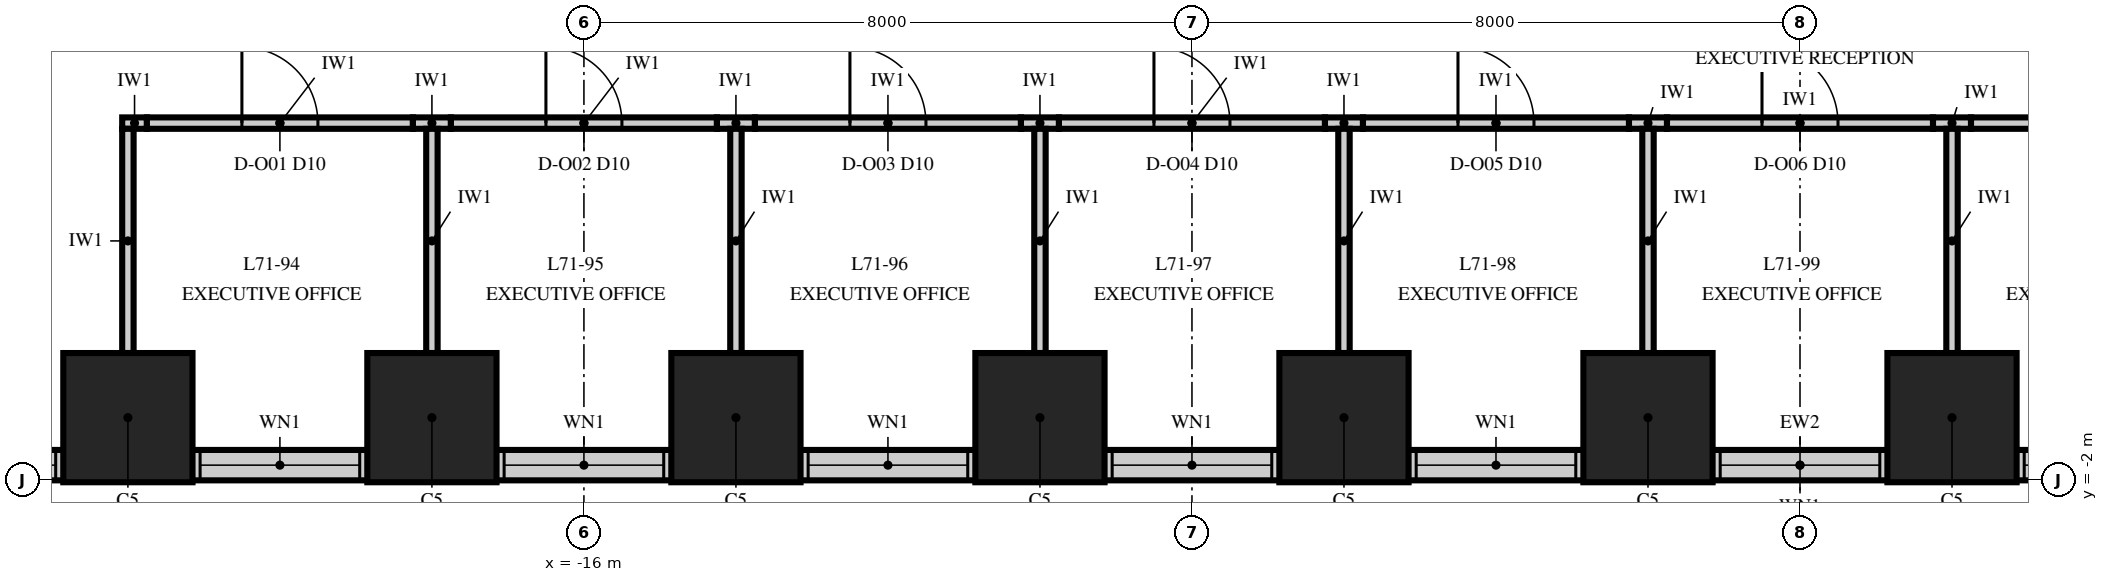
"""IFC4 building model, lengths in metres.
Left out: names, types, materials, properties, quantities, classifications, styles, units other than length and angle.
Written with IfcOpenShell. Run it as: python <this file> out.ifc"""

import sys

from ifc_helpers import new_model, si_unit, direction, frame, frame_2d, origin, origin_2d, place, context, subcontext, project, spatial, rectangle, extrude, element, fill, save


model = new_model("IFC4")
c1 = context("Model", 3, precision=1e-05, world=origin(), true_north=direction((0.0, 1.0)))
c2 = subcontext(c1, "Body", "Model", "MODEL_VIEW")
j1 = project(units=[si_unit("LENGTHUNIT", "METRE"), si_unit("PLANEANGLEUNIT", "RADIAN")], contexts=[c1])
p1 = place(None, origin())
s1 = spatial("IfcSite", under=j1, at=p1, CompositionType="ELEMENT")
p2 = place(p1, origin())
s2 = spatial("IfcBuilding", under=s1, at=p2, CompositionType="ELEMENT")
p3 = place(p2, frame((0.0, 0.0, 304.0)))
s3 = spatial("IfcBuildingStorey", under=s2, at=p3, CompositionType="ELEMENT", Elevation=304.0)
for number, where, z_axis, x_axis in (
    (1, (-22.0, -1.175, 0.0), (0.0, 0.0, 1.0), (1.0, 0.0, 0.0)),
    (2, (-18.0, -1.175, 0.0), (0.0, 0.0, 1.0), (1.0, 0.0, 0.0)),
    (3, (-14.0, -1.175, 0.0), (0.0, 0.0, 1.0), (1.0, 0.0, 0.0)),
    (4, (-10.0, -1.175, 0.0), (0.0, 0.0, 1.0), (1.0, 0.0, 0.0)),
    (5, (-6.0, -1.175, 0.0), (0.0, 0.0, 1.0), (1.0, 0.0, 0.0)),
    (6, (-2.0, -1.175, 0.0), (0.0, 0.0, 1.0), (1.0, 0.0, 0.0)),
    (7, (2.0, -1.175, 0.0), (0.0, 0.0, 1.0), (1.0, 0.0, 0.0)),
):
    element("IfcColumn", number, at=place(p3, frame(where, z_axis=z_axis, x_axis=x_axis)), inside=s3, PredefinedType="COLUMN", context=c2, shape_type="SweptSolid", body=[
        extrude(rectangle(XDim=1.7, YDim=1.7, at=origin_2d()), origin(), (0.0, 0.0, 1.0), 3.75),
    ])
p4 = place(p3, frame((-26.0, -1.8, 0.0), z_axis=(0.0, 0.0, 1.0), x_axis=(1.0, 0.0, 0.0)))
e8 = element("IfcWall", 8, at=p4, inside=s3, PredefinedType="SOLIDWALL", context=c2, shape_type="SweptSolid", body=[
    extrude(rectangle(XDim=52.0, YDim=0.4, at=frame_2d((26.0, 0.0))), origin(), (0.0, 0.0, 1.0), 2.0),
])
p5 = place(p4, frame((0.95, 0.0, 0.8)))
e9 = element("IfcOpeningElement", 9, at=p5, cuts=e8, PredefinedType="OPENING", context=c2, shape_type="SweptSolid", body=[
    extrude(rectangle(XDim=2.1, YDim=1.15, at=frame_2d((1.05, 0.575))), frame((0.0, 0.215, 0.0), z_axis=(0.0, -1.0, 0.0), x_axis=(1.0, 0.0, 0.0)), (0.0, 0.0, 1.0), 0.43),
])
p6 = place(p4, frame((4.95, 0.0, 0.8)))
e10 = element("IfcOpeningElement", 10, at=p6, cuts=e8, PredefinedType="OPENING", context=c2, shape_type="SweptSolid", body=[
    extrude(rectangle(XDim=2.1, YDim=1.15, at=frame_2d((1.05, 0.575))), frame((0.0, 0.215, 0.0), z_axis=(0.0, -1.0, 0.0), x_axis=(1.0, 0.0, 0.0)), (0.0, 0.0, 1.0), 0.43),
])
p7 = place(p4, frame((8.95, 0.0, 0.8)))
e11 = element("IfcOpeningElement", 11, at=p7, cuts=e8, PredefinedType="OPENING", context=c2, shape_type="SweptSolid", body=[
    extrude(rectangle(XDim=2.1, YDim=1.15, at=frame_2d((1.05, 0.575))), frame((0.0, 0.215, 0.0), z_axis=(0.0, -1.0, 0.0), x_axis=(1.0, 0.0, 0.0)), (0.0, 0.0, 1.0), 0.43),
])
p8 = place(p4, frame((12.95, 0.0, 0.8)))
e12 = element("IfcOpeningElement", 12, at=p8, cuts=e8, PredefinedType="OPENING", context=c2, shape_type="SweptSolid", body=[
    extrude(rectangle(XDim=2.1, YDim=1.15, at=frame_2d((1.05, 0.575))), frame((0.0, 0.215, 0.0), z_axis=(0.0, -1.0, 0.0), x_axis=(1.0, 0.0, 0.0)), (0.0, 0.0, 1.0), 0.43),
])
p9 = place(p4, frame((16.95, 0.0, 0.8)))
e13 = element("IfcOpeningElement", 13, at=p9, cuts=e8, PredefinedType="OPENING", context=c2, shape_type="SweptSolid", body=[
    extrude(rectangle(XDim=2.1, YDim=1.15, at=frame_2d((1.05, 0.575))), frame((0.0, 0.215, 0.0), z_axis=(0.0, -1.0, 0.0), x_axis=(1.0, 0.0, 0.0)), (0.0, 0.0, 1.0), 0.43),
])
p10 = place(p4, frame((20.95, 0.0, 0.8)))
e14 = element("IfcOpeningElement", 14, at=p10, cuts=e8, PredefinedType="OPENING", context=c2, shape_type="SweptSolid", body=[
    extrude(rectangle(XDim=2.1, YDim=1.15, at=frame_2d((1.05, 0.575))), frame((0.0, 0.215, 0.0), z_axis=(0.0, -1.0, 0.0), x_axis=(1.0, 0.0, 0.0)), (0.0, 0.0, 1.0), 0.43),
])
p11 = place(p4, frame((24.95, 0.0, 0.8)))
e15 = element("IfcOpeningElement", 15, at=p11, cuts=e8, PredefinedType="OPENING", context=c2, shape_type="SweptSolid", body=[
    extrude(rectangle(XDim=2.1, YDim=1.15, at=frame_2d((1.05, 0.575))), frame((0.0, 0.215, 0.0), z_axis=(0.0, -1.0, 0.0), x_axis=(1.0, 0.0, 0.0)), (0.0, 0.0, 1.0), 0.43),
])
p12 = place(p4, frame((28.95, 0.0, 0.8)))
e16 = element("IfcOpeningElement", 16, at=p12, cuts=e8, PredefinedType="OPENING", context=c2, shape_type="SweptSolid", body=[
    extrude(rectangle(XDim=2.1, YDim=1.15, at=frame_2d((1.05, 0.575))), frame((0.0, 0.215, 0.0), z_axis=(0.0, -1.0, 0.0), x_axis=(1.0, 0.0, 0.0)), (0.0, 0.0, 1.0), 0.43),
])
p13 = place(p4, frame((32.95, 0.0, 0.8)))
e17 = element("IfcOpeningElement", 17, at=p13, cuts=e8, PredefinedType="OPENING", context=c2, shape_type="SweptSolid", body=[
    extrude(rectangle(XDim=2.1, YDim=1.15, at=frame_2d((1.05, 0.575))), frame((0.0, 0.215, 0.0), z_axis=(0.0, -1.0, 0.0), x_axis=(1.0, 0.0, 0.0)), (0.0, 0.0, 1.0), 0.43),
])
p14 = place(p4, frame((36.95, 0.0, 0.8)))
e18 = element("IfcOpeningElement", 18, at=p14, cuts=e8, PredefinedType="OPENING", context=c2, shape_type="SweptSolid", body=[
    extrude(rectangle(XDim=2.1, YDim=1.15, at=frame_2d((1.05, 0.575))), frame((0.0, 0.215, 0.0), z_axis=(0.0, -1.0, 0.0), x_axis=(1.0, 0.0, 0.0)), (0.0, 0.0, 1.0), 0.43),
])
p15 = place(p4, frame((40.95, 0.0, 0.8)))
e19 = element("IfcOpeningElement", 19, at=p15, cuts=e8, PredefinedType="OPENING", context=c2, shape_type="SweptSolid", body=[
    extrude(rectangle(XDim=2.1, YDim=1.15, at=frame_2d((1.05, 0.575))), frame((0.0, 0.215, 0.0), z_axis=(0.0, -1.0, 0.0), x_axis=(1.0, 0.0, 0.0)), (0.0, 0.0, 1.0), 0.43),
])
p16 = place(p4, frame((44.95, 0.0, 0.8)))
e20 = element("IfcOpeningElement", 20, at=p16, cuts=e8, PredefinedType="OPENING", context=c2, shape_type="SweptSolid", body=[
    extrude(rectangle(XDim=2.1, YDim=1.15, at=frame_2d((1.05, 0.575))), frame((0.0, 0.215, 0.0), z_axis=(0.0, -1.0, 0.0), x_axis=(1.0, 0.0, 0.0)), (0.0, 0.0, 1.0), 0.43),
])
p17 = place(p4, frame((48.95, 0.0, 0.8)))
e21 = element("IfcOpeningElement", 21, at=p17, cuts=e8, PredefinedType="OPENING", context=c2, shape_type="SweptSolid", body=[
    extrude(rectangle(XDim=2.1, YDim=1.15, at=frame_2d((1.05, 0.575))), frame((0.0, 0.215, 0.0), z_axis=(0.0, -1.0, 0.0), x_axis=(1.0, 0.0, 0.0)), (0.0, 0.0, 1.0), 0.43),
])
p18 = place(p3, frame((-22.075, 2.7, 0.0), z_axis=(0.0, 0.0, 1.0), x_axis=(1.0, 0.0, 0.0)))
e22 = element("IfcWall", 22, at=p18, inside=s3, PredefinedType="PARTITIONING", context=c2, shape_type="SweptSolid", body=[
    extrude(rectangle(XDim=0.325, YDim=0.15, at=frame_2d((0.163, 0.0))), origin(), (0.0, 0.0, 1.0), 2.15),
])
p19 = place(p3, frame((-21.75, 2.7, 0.0), z_axis=(0.0, 0.0, 1.0), x_axis=(1.0, 0.0, 0.0)))
e23 = element("IfcWall", 23, at=p19, inside=s3, PredefinedType="PARTITIONING", context=c2, shape_type="SweptSolid", body=[
    extrude(rectangle(XDim=3.5, YDim=0.15, at=frame_2d((1.75, 0.0))), origin(), (0.0, 0.0, 1.0), 3.85),
])
p20 = place(p19, frame((1.25, 0.0, 0.0)))
e24 = element("IfcOpeningElement", 24, at=p20, cuts=e23, PredefinedType="OPENING", context=c2, shape_type="SweptSolid", body=[
    extrude(rectangle(XDim=1.0, YDim=2.3, at=frame_2d((0.5, 1.15))), frame((0.0, 0.09, 0.0), z_axis=(0.0, -1.0, 0.0), x_axis=(1.0, 0.0, 0.0)), (0.0, 0.0, 1.0), 0.18),
])
p21 = place(p3, frame((-18.25, 2.7, 0.0), z_axis=(0.0, 0.0, 1.0), x_axis=(1.0, 0.0, 0.0)))
e25 = element("IfcWall", 25, at=p21, inside=s3, PredefinedType="PARTITIONING", context=c2, shape_type="SweptSolid", body=[
    extrude(rectangle(XDim=0.5, YDim=0.15, at=frame_2d((0.25, 0.0))), origin(), (0.0, 0.0, 1.0), 2.15),
])
p22 = place(p3, frame((-17.75, 2.7, 0.0), z_axis=(0.0, 0.0, 1.0), x_axis=(1.0, 0.0, 0.0)))
e26 = element("IfcWall", 26, at=p22, inside=s3, PredefinedType="PARTITIONING", context=c2, shape_type="SweptSolid", body=[
    extrude(rectangle(XDim=3.5, YDim=0.15, at=frame_2d((1.75, 0.0))), origin(), (0.0, 0.0, 1.0), 3.85),
])
p23 = place(p22, frame((1.25, 0.0, 0.0)))
e27 = element("IfcOpeningElement", 27, at=p23, cuts=e26, PredefinedType="OPENING", context=c2, shape_type="SweptSolid", body=[
    extrude(rectangle(XDim=1.0, YDim=2.3, at=frame_2d((0.5, 1.15))), frame((0.0, 0.09, 0.0), z_axis=(0.0, -1.0, 0.0), x_axis=(1.0, 0.0, 0.0)), (0.0, 0.0, 1.0), 0.18),
])
p24 = place(p3, frame((-14.25, 2.7, 0.0), z_axis=(0.0, 0.0, 1.0), x_axis=(1.0, 0.0, 0.0)))
e28 = element("IfcWall", 28, at=p24, inside=s3, PredefinedType="PARTITIONING", context=c2, shape_type="SweptSolid", body=[
    extrude(rectangle(XDim=0.5, YDim=0.15, at=frame_2d((0.25, 0.0))), origin(), (0.0, 0.0, 1.0), 2.15),
])
p25 = place(p3, frame((-13.75, 2.7, 0.0), z_axis=(0.0, 0.0, 1.0), x_axis=(1.0, 0.0, 0.0)))
e29 = element("IfcWall", 29, at=p25, inside=s3, PredefinedType="PARTITIONING", context=c2, shape_type="SweptSolid", body=[
    extrude(rectangle(XDim=3.5, YDim=0.15, at=frame_2d((1.75, 0.0))), origin(), (0.0, 0.0, 1.0), 3.85),
])
p26 = place(p25, frame((1.25, 0.0, 0.0)))
e30 = element("IfcOpeningElement", 30, at=p26, cuts=e29, PredefinedType="OPENING", context=c2, shape_type="SweptSolid", body=[
    extrude(rectangle(XDim=1.0, YDim=2.3, at=frame_2d((0.5, 1.15))), frame((0.0, 0.09, 0.0), z_axis=(0.0, -1.0, 0.0), x_axis=(1.0, 0.0, 0.0)), (0.0, 0.0, 1.0), 0.18),
])
p27 = place(p3, frame((-10.25, 2.7, 0.0), z_axis=(0.0, 0.0, 1.0), x_axis=(1.0, 0.0, 0.0)))
e31 = element("IfcWall", 31, at=p27, inside=s3, PredefinedType="PARTITIONING", context=c2, shape_type="SweptSolid", body=[
    extrude(rectangle(XDim=0.5, YDim=0.15, at=frame_2d((0.25, 0.0))), origin(), (0.0, 0.0, 1.0), 2.15),
])
p28 = place(p3, frame((-9.75, 2.7, 0.0), z_axis=(0.0, 0.0, 1.0), x_axis=(1.0, 0.0, 0.0)))
e32 = element("IfcWall", 32, at=p28, inside=s3, PredefinedType="PARTITIONING", context=c2, shape_type="SweptSolid", body=[
    extrude(rectangle(XDim=3.5, YDim=0.15, at=frame_2d((1.75, 0.0))), origin(), (0.0, 0.0, 1.0), 3.85),
])
p29 = place(p28, frame((1.25, 0.0, 0.0)))
e33 = element("IfcOpeningElement", 33, at=p29, cuts=e32, PredefinedType="OPENING", context=c2, shape_type="SweptSolid", body=[
    extrude(rectangle(XDim=1.0, YDim=2.3, at=frame_2d((0.5, 1.15))), frame((0.0, 0.09, 0.0), z_axis=(0.0, -1.0, 0.0), x_axis=(1.0, 0.0, 0.0)), (0.0, 0.0, 1.0), 0.18),
])
p30 = place(p3, frame((-6.25, 2.7, 0.0), z_axis=(0.0, 0.0, 1.0), x_axis=(1.0, 0.0, 0.0)))
e34 = element("IfcWall", 34, at=p30, inside=s3, PredefinedType="PARTITIONING", context=c2, shape_type="SweptSolid", body=[
    extrude(rectangle(XDim=0.5, YDim=0.15, at=frame_2d((0.25, 0.0))), origin(), (0.0, 0.0, 1.0), 2.15),
])
p31 = place(p3, frame((-5.75, 2.7, 0.0), z_axis=(0.0, 0.0, 1.0), x_axis=(1.0, 0.0, 0.0)))
e35 = element("IfcWall", 35, at=p31, inside=s3, PredefinedType="PARTITIONING", context=c2, shape_type="SweptSolid", body=[
    extrude(rectangle(XDim=3.5, YDim=0.15, at=frame_2d((1.75, 0.0))), origin(), (0.0, 0.0, 1.0), 3.85),
])
p32 = place(p31, frame((1.25, 0.0, 0.0)))
e36 = element("IfcOpeningElement", 36, at=p32, cuts=e35, PredefinedType="OPENING", context=c2, shape_type="SweptSolid", body=[
    extrude(rectangle(XDim=1.0, YDim=2.3, at=frame_2d((0.5, 1.15))), frame((0.0, 0.09, 0.0), z_axis=(0.0, -1.0, 0.0), x_axis=(1.0, 0.0, 0.0)), (0.0, 0.0, 1.0), 0.18),
])
p33 = place(p3, frame((-2.25, 2.7, 0.0), z_axis=(0.0, 0.0, 1.0), x_axis=(1.0, 0.0, 0.0)))
e37 = element("IfcWall", 37, at=p33, inside=s3, PredefinedType="PARTITIONING", context=c2, shape_type="SweptSolid", body=[
    extrude(rectangle(XDim=0.5, YDim=0.15, at=frame_2d((0.25, 0.0))), origin(), (0.0, 0.0, 1.0), 2.15),
])
p34 = place(p3, frame((-1.75, 2.7, 0.0), z_axis=(0.0, 0.0, 1.0), x_axis=(1.0, 0.0, 0.0)))
e38 = element("IfcWall", 38, at=p34, inside=s3, PredefinedType="PARTITIONING", context=c2, shape_type="SweptSolid", body=[
    extrude(rectangle(XDim=3.5, YDim=0.15, at=frame_2d((1.75, 0.0))), origin(), (0.0, 0.0, 1.0), 3.85),
])
p35 = place(p34, frame((1.25, 0.0, 0.0)))
e39 = element("IfcOpeningElement", 39, at=p35, cuts=e38, PredefinedType="OPENING", context=c2, shape_type="SweptSolid", body=[
    extrude(rectangle(XDim=1.0, YDim=2.3, at=frame_2d((0.5, 1.15))), frame((0.0, 0.09, 0.0), z_axis=(0.0, -1.0, 0.0), x_axis=(1.0, 0.0, 0.0)), (0.0, 0.0, 1.0), 0.18),
])
p36 = place(p3, frame((1.75, 2.7, 0.0), z_axis=(0.0, 0.0, 1.0), x_axis=(1.0, 0.0, 0.0)))
e40 = element("IfcWall", 40, at=p36, inside=s3, PredefinedType="PARTITIONING", context=c2, shape_type="SweptSolid", body=[
    extrude(rectangle(XDim=0.5, YDim=0.15, at=frame_2d((0.25, 0.0))), origin(), (0.0, 0.0, 1.0), 2.15),
])
p37 = place(p3, frame((2.25, 2.7, 0.0), z_axis=(0.0, 0.0, 1.0), x_axis=(1.0, 0.0, 0.0)))
e41 = element("IfcWall", 41, at=p37, inside=s3, PredefinedType="PARTITIONING", context=c2, shape_type="SweptSolid", body=[
    extrude(rectangle(XDim=3.5, YDim=0.15, at=frame_2d((1.75, 0.0))), origin(), (0.0, 0.0, 1.0), 3.85),
])
p38 = place(p37, frame((1.25, 0.0, 0.0)))
e42 = element("IfcOpeningElement", 42, at=p38, cuts=e41, PredefinedType="OPENING", context=c2, shape_type="SweptSolid", body=[
    extrude(rectangle(XDim=1.0, YDim=2.3, at=frame_2d((0.5, 1.15))), frame((0.0, 0.09, 0.0), z_axis=(0.0, -1.0, 0.0), x_axis=(1.0, 0.0, 0.0)), (0.0, 0.0, 1.0), 0.18),
])
for number, where, z_axis, x_axis in (
    (43, (-22.0, -0.325, 0.0), (0.0, 0.0, 1.0), (0.0, 1.0, 0.0)),
    (44, (-18.0, -0.325, 0.0), (0.0, 0.0, 1.0), (0.0, 1.0, 0.0)),
    (45, (-14.0, -0.325, 0.0), (0.0, 0.0, 1.0), (0.0, 1.0, 0.0)),
    (46, (-10.0, -0.325, 0.0), (0.0, 0.0, 1.0), (0.0, 1.0, 0.0)),
    (47, (-6.0, -0.325, 0.0), (0.0, 0.0, 1.0), (0.0, 1.0, 0.0)),
    (48, (-2.0, -0.325, 0.0), (0.0, 0.0, 1.0), (0.0, 1.0, 0.0)),
    (49, (2.0, -0.325, 0.0), (0.0, 0.0, 1.0), (0.0, 1.0, 0.0)),
):
    element("IfcWall", number, at=place(p3, frame(where, z_axis=z_axis, x_axis=x_axis)), inside=s3, PredefinedType="PARTITIONING", context=c2, shape_type="SweptSolid", body=[
        extrude(rectangle(XDim=2.95, YDim=0.15, at=frame_2d((1.475, 0.0))), origin(), (0.0, 0.0, 1.0), 2.15),
    ])
p39 = place(p5, origin())
e50 = element("IfcWindow", 50, at=p39, inside=s3, PartitioningType="SINGLE_PANEL", PredefinedType="WINDOW", context=c2, shape_type="SweptSolid", body=[
    extrude(rectangle(XDim=2.1, YDim=1.15, at=frame_2d((1.05, 0.575))), frame((0.0, 0.03, 0.0), z_axis=(0.0, -1.0, 0.0), x_axis=(1.0, 0.0, 0.0)), (0.0, 0.0, 1.0), 0.06),
])
fill(e9, e50)
p40 = place(p6, origin())
e51 = element("IfcWindow", 51, at=p40, inside=s3, PartitioningType="SINGLE_PANEL", PredefinedType="WINDOW", context=c2, shape_type="SweptSolid", body=[
    extrude(rectangle(XDim=2.1, YDim=1.15, at=frame_2d((1.05, 0.575))), frame((0.0, 0.03, 0.0), z_axis=(0.0, -1.0, 0.0), x_axis=(1.0, 0.0, 0.0)), (0.0, 0.0, 1.0), 0.06),
])
fill(e10, e51)
p41 = place(p7, origin())
e52 = element("IfcWindow", 52, at=p41, inside=s3, PartitioningType="SINGLE_PANEL", PredefinedType="WINDOW", context=c2, shape_type="SweptSolid", body=[
    extrude(rectangle(XDim=2.1, YDim=1.15, at=frame_2d((1.05, 0.575))), frame((0.0, 0.03, 0.0), z_axis=(0.0, -1.0, 0.0), x_axis=(1.0, 0.0, 0.0)), (0.0, 0.0, 1.0), 0.06),
])
fill(e11, e52)
p42 = place(p8, origin())
e53 = element("IfcWindow", 53, at=p42, inside=s3, PartitioningType="SINGLE_PANEL", PredefinedType="WINDOW", context=c2, shape_type="SweptSolid", body=[
    extrude(rectangle(XDim=2.1, YDim=1.15, at=frame_2d((1.05, 0.575))), frame((0.0, 0.03, 0.0), z_axis=(0.0, -1.0, 0.0), x_axis=(1.0, 0.0, 0.0)), (0.0, 0.0, 1.0), 0.06),
])
fill(e12, e53)
p43 = place(p9, origin())
e54 = element("IfcWindow", 54, at=p43, inside=s3, PartitioningType="SINGLE_PANEL", PredefinedType="WINDOW", context=c2, shape_type="SweptSolid", body=[
    extrude(rectangle(XDim=2.1, YDim=1.15, at=frame_2d((1.05, 0.575))), frame((0.0, 0.03, 0.0), z_axis=(0.0, -1.0, 0.0), x_axis=(1.0, 0.0, 0.0)), (0.0, 0.0, 1.0), 0.06),
])
fill(e13, e54)
p44 = place(p10, origin())
e55 = element("IfcWindow", 55, at=p44, inside=s3, PartitioningType="SINGLE_PANEL", PredefinedType="WINDOW", context=c2, shape_type="SweptSolid", body=[
    extrude(rectangle(XDim=2.1, YDim=1.15, at=frame_2d((1.05, 0.575))), frame((0.0, 0.03, 0.0), z_axis=(0.0, -1.0, 0.0), x_axis=(1.0, 0.0, 0.0)), (0.0, 0.0, 1.0), 0.06),
])
fill(e14, e55)
p45 = place(p11, origin())
e56 = element("IfcWindow", 56, at=p45, inside=s3, PartitioningType="SINGLE_PANEL", PredefinedType="WINDOW", context=c2, shape_type="SweptSolid", body=[
    extrude(rectangle(XDim=2.1, YDim=1.15, at=frame_2d((1.05, 0.575))), frame((0.0, 0.03, 0.0), z_axis=(0.0, -1.0, 0.0), x_axis=(1.0, 0.0, 0.0)), (0.0, 0.0, 1.0), 0.06),
])
fill(e15, e56)
p46 = place(p12, origin())
e57 = element("IfcWindow", 57, at=p46, inside=s3, PartitioningType="SINGLE_PANEL", PredefinedType="WINDOW", context=c2, shape_type="SweptSolid", body=[
    extrude(rectangle(XDim=2.1, YDim=1.15, at=frame_2d((1.05, 0.575))), frame((0.0, 0.03, 0.0), z_axis=(0.0, -1.0, 0.0), x_axis=(1.0, 0.0, 0.0)), (0.0, 0.0, 1.0), 0.06),
])
fill(e16, e57)
p47 = place(p20, origin())
e58 = element("IfcDoor", 58, at=p47, inside=s3, OperationType="SINGLE_SWING_LEFT", PredefinedType="DOOR", context=c2, shape_type="SweptSolid", body=[
    extrude(rectangle(XDim=1.0, YDim=2.3, at=frame_2d((0.5, 1.15))), frame((0.0, 0.075, 0.0), z_axis=(0.0, -1.0, 0.0), x_axis=(1.0, 0.0, 0.0)), (0.0, 0.0, 1.0), 0.149),
])
fill(e24, e58)
p48 = place(p23, origin())
e59 = element("IfcDoor", 59, at=p48, inside=s3, OperationType="SINGLE_SWING_LEFT", PredefinedType="DOOR", context=c2, shape_type="SweptSolid", body=[
    extrude(rectangle(XDim=1.0, YDim=2.3, at=frame_2d((0.5, 1.15))), frame((0.0, 0.075, 0.0), z_axis=(0.0, -1.0, 0.0), x_axis=(1.0, 0.0, 0.0)), (0.0, 0.0, 1.0), 0.149),
])
fill(e27, e59)
p49 = place(p26, origin())
e60 = element("IfcDoor", 60, at=p49, inside=s3, OperationType="SINGLE_SWING_LEFT", PredefinedType="DOOR", context=c2, shape_type="SweptSolid", body=[
    extrude(rectangle(XDim=1.0, YDim=2.3, at=frame_2d((0.5, 1.15))), frame((0.0, 0.075, 0.0), z_axis=(0.0, -1.0, 0.0), x_axis=(1.0, 0.0, 0.0)), (0.0, 0.0, 1.0), 0.149),
])
fill(e30, e60)
p50 = place(p29, origin())
e61 = element("IfcDoor", 61, at=p50, inside=s3, OperationType="SINGLE_SWING_LEFT", PredefinedType="DOOR", context=c2, shape_type="SweptSolid", body=[
    extrude(rectangle(XDim=1.0, YDim=2.3, at=frame_2d((0.5, 1.15))), frame((0.0, 0.075, 0.0), z_axis=(0.0, -1.0, 0.0), x_axis=(1.0, 0.0, 0.0)), (0.0, 0.0, 1.0), 0.149),
])
fill(e33, e61)
p51 = place(p32, origin())
e62 = element("IfcDoor", 62, at=p51, inside=s3, OperationType="SINGLE_SWING_LEFT", PredefinedType="DOOR", context=c2, shape_type="SweptSolid", body=[
    extrude(rectangle(XDim=1.0, YDim=2.3, at=frame_2d((0.5, 1.15))), frame((0.0, 0.075, 0.0), z_axis=(0.0, -1.0, 0.0), x_axis=(1.0, 0.0, 0.0)), (0.0, 0.0, 1.0), 0.149),
])
fill(e36, e62)
p52 = place(p35, origin())
e63 = element("IfcDoor", 63, at=p52, inside=s3, OperationType="SINGLE_SWING_LEFT", PredefinedType="DOOR", context=c2, shape_type="SweptSolid", body=[
    extrude(rectangle(XDim=1.0, YDim=2.3, at=frame_2d((0.5, 1.15))), frame((0.0, 0.075, 0.0), z_axis=(0.0, -1.0, 0.0), x_axis=(1.0, 0.0, 0.0)), (0.0, 0.0, 1.0), 0.149),
])
fill(e39, e63)
save(model, sys.argv[1])
